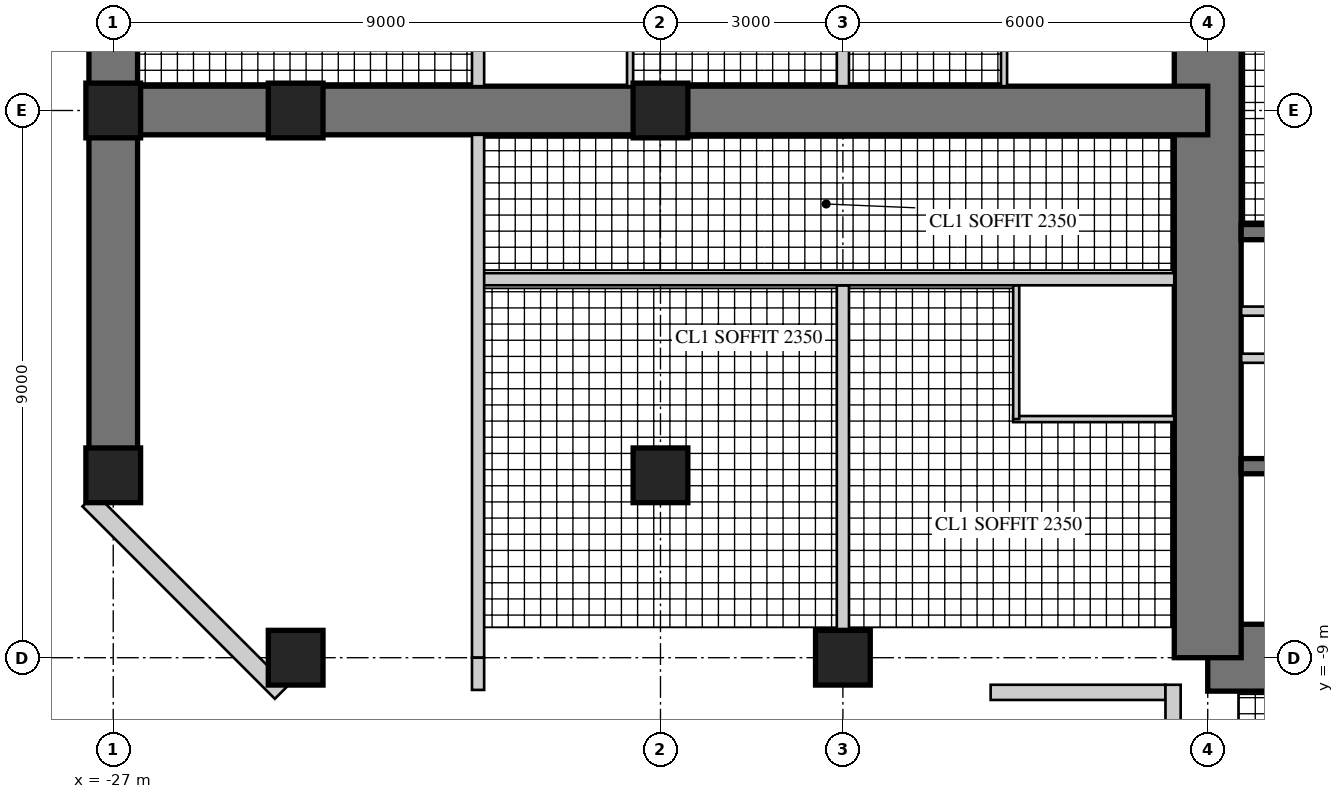
"""IFC4 building model, lengths in metres.
Left out: names, types, materials, properties, quantities, classifications, styles, units other than length and angle.
Written with IfcOpenShell. Run it as: python <this file> out.ifc"""

import sys

from ifc_helpers import new_model, si_unit, direction, frame, frame_2d, origin, origin_2d, place, context, subcontext, project, spatial, rectangle, hollow_rectangle, extrude, element, fill, save


model = new_model("IFC4")
c1 = context("Model", 3, precision=1e-05, world=origin(), true_north=direction((0.0, 1.0)))
c2 = subcontext(c1, "Body", "Model", "MODEL_VIEW")
j1 = project(units=[si_unit("LENGTHUNIT", "METRE"), si_unit("PLANEANGLEUNIT", "RADIAN")], contexts=[c1])
p1 = place(None, origin())
s1 = spatial("IfcSite", under=j1, at=p1, CompositionType="ELEMENT")
p2 = place(p1, origin())
s2 = spatial("IfcBuilding", under=s1, at=p2, CompositionType="ELEMENT")
p3 = place(p2, frame((0.0, 0.0, 206.9)))
s3 = spatial("IfcBuildingStorey", under=s2, at=p3, CompositionType="ELEMENT", Elevation=206.9)
p4 = place(p3, frame((-9.0, -9.0, 0.0), z_axis=(0.0, 0.0, 1.0), x_axis=(1.0, 0.0, 0.0)))
e1 = element("IfcWall", 1, at=p4, inside=s3, PredefinedType="SHEAR", context=c2, shape_type="SweptSolid", body=[
    extrude(rectangle(XDim=18.0, YDim=1.1, at=frame_2d((9.0, 0.0))), origin(), (0.0, 0.0, 1.0), 3.4),
])
p5 = place(p4, frame((9.8, 0.0, 0.0)))
e2 = element("IfcOpeningElement", 2, at=p5, cuts=e1, PredefinedType="OPENING", context=c2, shape_type="SweptSolid", body=[
    extrude(rectangle(XDim=1.0, YDim=2.4, at=frame_2d((0.5, 1.2))), frame((0.0, 0.56, 0.0), z_axis=(0.0, -1.0, 0.0), x_axis=(1.0, 0.0, 0.0)), (0.0, 0.0, 1.0), 1.12),
])
p6 = place(p3, frame((-9.0, 9.0, 0.0), z_axis=(0.0, 0.0, 1.0), x_axis=(0.0, -1.0, 0.0)))
e3 = element("IfcWall", 3, at=p6, inside=s3, PredefinedType="SHEAR", context=c2, shape_type="SweptSolid", body=[
    extrude(rectangle(XDim=18.0, YDim=1.1, at=frame_2d((9.0, 0.0))), origin(), (0.0, 0.0, 1.0), 3.4),
])
p7 = place(p6, frame((9.8, 0.0, 0.0)))
e4 = element("IfcOpeningElement", 4, at=p7, cuts=e3, PredefinedType="OPENING", context=c2, shape_type="SweptSolid", body=[
    extrude(rectangle(XDim=1.0, YDim=2.4, at=frame_2d((0.5, 1.2))), frame((0.0, 0.56, 0.0), z_axis=(0.0, -1.0, 0.0), x_axis=(1.0, 0.0, 0.0)), (0.0, 0.0, 1.0), 1.12),
])
p8 = place(p3, frame((-1.925, -2.0, 0.0), z_axis=(0.0, 0.0, 1.0), x_axis=(-1.0, 0.0, 0.0)))
e5 = element("IfcWall", 5, at=p8, inside=s3, PredefinedType="SHEAR", context=c2, shape_type="SweptSolid", body=[
    extrude(rectangle(XDim=6.525, YDim=0.25, at=frame_2d((3.262, 0.0))), origin(), (0.0, 0.0, 1.0), 3.4),
])
p9 = place(p3, frame((-1.925, -5.85, 0.0), z_axis=(0.0, 0.0, 1.0), x_axis=(-1.0, 0.0, 0.0)))
e6 = element("IfcWall", 6, at=p9, inside=s3, PredefinedType="SHEAR", context=c2, shape_type="SweptSolid", body=[
    extrude(rectangle(XDim=6.525, YDim=0.25, at=frame_2d((3.262, 0.0))), origin(), (0.0, 0.0, 1.0), 3.4),
])
p10 = place(p9, frame((0.471, 0.0, 0.0)))
e7 = element("IfcOpeningElement", 7, at=p10, cuts=e6, PredefinedType="OPENING", context=c2, shape_type="SweptSolid", body=[
    extrude(rectangle(XDim=1.1, YDim=2.2, at=frame_2d((0.55, 1.1))), frame((0.0, 0.135, 0.0), z_axis=(0.0, -1.0, 0.0), x_axis=(1.0, 0.0, 0.0)), (0.0, 0.0, 1.0), 0.27),
])
p11 = place(p9, frame((2.712, 0.0, 0.0)))
e8 = element("IfcOpeningElement", 8, at=p11, cuts=e6, PredefinedType="OPENING", context=c2, shape_type="SweptSolid", body=[
    extrude(rectangle(XDim=1.1, YDim=2.2, at=frame_2d((0.55, 1.1))), frame((0.0, 0.135, 0.0), z_axis=(0.0, -1.0, 0.0), x_axis=(1.0, 0.0, 0.0)), (0.0, 0.0, 1.0), 0.27),
])
p12 = place(p9, frame((4.954, 0.0, 0.0)))
e9 = element("IfcOpeningElement", 9, at=p12, cuts=e6, PredefinedType="OPENING", context=c2, shape_type="SweptSolid", body=[
    extrude(rectangle(XDim=1.1, YDim=2.2, at=frame_2d((0.55, 1.1))), frame((0.0, 0.135, 0.0), z_axis=(0.0, -1.0, 0.0), x_axis=(1.0, 0.0, 0.0)), (0.0, 0.0, 1.0), 0.27),
])
p13 = place(p3, frame((-1.925, -3.3, 0.0), z_axis=(0.0, 0.0, 1.0), x_axis=(-1.0, 0.0, 0.0)))
e10 = element("IfcWall", 10, at=p13, inside=s3, PredefinedType="PARTITIONING", context=c2, shape_type="SweptSolid", body=[
    extrude(rectangle(XDim=6.525, YDim=0.15, at=frame_2d((3.262, 0.0))), origin(), (0.0, 0.0, 1.0), 3.4),
])
p14 = place(p13, frame((0.075, 0.0, 0.0)))
e11 = element("IfcOpeningElement", 11, at=p14, cuts=e10, PredefinedType="OPENING", context=c2, shape_type="SweptSolid", body=[
    extrude(rectangle(XDim=0.8, YDim=2.1, at=frame_2d((0.4, 1.05))), frame((0.0, 0.085, 0.0), z_axis=(0.0, -1.0, 0.0), x_axis=(1.0, 0.0, 0.0)), (0.0, 0.0, 1.0), 0.17),
])
p15 = place(p13, frame((3.675, 0.0, 0.0)))
e12 = element("IfcOpeningElement", 12, at=p15, cuts=e10, PredefinedType="OPENING", context=c2, shape_type="SweptSolid", body=[
    extrude(rectangle(XDim=0.8, YDim=2.1, at=frame_2d((0.4, 1.05))), frame((0.0, 0.085, 0.0), z_axis=(0.0, -1.0, 0.0), x_axis=(1.0, 0.0, 0.0)), (0.0, 0.0, 1.0), 0.17),
])
p16 = place(p3, frame((-9.0, 0.0, 0.0), z_axis=(0.0, 0.0, 1.0), x_axis=(-1.0, 0.0, 0.0)))
e13 = element("IfcWall", 13, at=p16, inside=s3, PredefinedType="SHEAR", context=c2, shape_type="SweptSolid", body=[
    extrude(rectangle(XDim=18.0, YDim=0.8, at=frame_2d((9.0, 0.0))), origin(), (0.0, 0.0, 1.0), 3.4),
])
p17 = place(p16, frame((3.95, 0.0, 0.0)))
e14 = element("IfcOpeningElement", 14, at=p17, cuts=e13, PredefinedType="OPENING", context=c2, shape_type="SweptSolid", body=[
    extrude(rectangle(XDim=1.0, YDim=2.15, at=frame_2d((0.5, 1.075))), frame((0.0, 0.41, 0.0), z_axis=(0.0, -1.0, 0.0), x_axis=(1.0, 0.0, 0.0)), (0.0, 0.0, 1.0), 0.82),
])
p18 = place(p16, frame((6.6, 0.0, 0.0)))
e15 = element("IfcOpeningElement", 15, at=p18, cuts=e13, PredefinedType="OPENING", context=c2, shape_type="SweptSolid", body=[
    extrude(rectangle(XDim=1.0, YDim=2.15, at=frame_2d((0.5, 1.075))), frame((0.0, 0.41, 0.0), z_axis=(0.0, -1.0, 0.0), x_axis=(1.0, 0.0, 0.0)), (0.0, 0.0, 1.0), 0.82),
])
p19 = place(p16, frame((13.25, 0.0, 0.0)))
e16 = element("IfcOpeningElement", 16, at=p19, cuts=e13, PredefinedType="OPENING", context=c2, shape_type="SweptSolid", body=[
    extrude(rectangle(XDim=1.0, YDim=2.2, at=frame_2d((0.5, 1.1))), frame((0.0, 0.41, 0.0), z_axis=(0.0, -1.0, 0.0), x_axis=(1.0, 0.0, 0.0)), (0.0, 0.0, 1.0), 0.82),
])
p20 = place(p3, frame((-27.0, 6.0, 0.0), z_axis=(0.0, 0.0, 1.0), x_axis=(0.0, -1.0, 0.0)))
e17 = element("IfcWall", 17, at=p20, inside=s3, PredefinedType="SHEAR", context=c2, shape_type="SweptSolid", body=[
    extrude(rectangle(XDim=12.0, YDim=0.8, at=frame_2d((6.0, 0.0))), origin(), (0.0, 0.0, 1.0), 3.4),
])
p21 = place(p20, frame((1.625, 0.0, 0.6)))
e18 = element("IfcOpeningElement", 18, at=p21, cuts=e17, PredefinedType="OPENING", context=c2, shape_type="SweptSolid", body=[
    extrude(rectangle(XDim=3.0, YDim=2.4, at=frame_2d((1.5, 1.2))), frame((0.0, 0.41, 0.0), z_axis=(0.0, -1.0, 0.0), x_axis=(1.0, 0.0, 0.0)), (0.0, 0.0, 1.0), 0.82),
])
p22 = place(p20, frame((7.375, 0.0, 0.6)))
e19 = element("IfcOpeningElement", 19, at=p22, cuts=e17, PredefinedType="OPENING", context=c2, shape_type="SweptSolid", body=[
    extrude(rectangle(XDim=3.0, YDim=2.4, at=frame_2d((1.5, 1.2))), frame((0.0, 0.41, 0.0), z_axis=(0.0, -1.0, 0.0), x_axis=(1.0, 0.0, 0.0)), (0.0, 0.0, 1.0), 0.82),
])
for number, where, z_axis, x_axis in (
    (20, (-15.0, -9.0, 0.0), (0.0, 0.0, 1.0), (1.0, 0.0, 0.0)),
    (21, (-24.0, -9.0, 0.0), (0.0, 0.0, 1.0), (1.0, 0.0, 0.0)),
    (22, (-27.0, 0.0, 0.0), (0.0, 0.0, 1.0), (1.0, 0.0, 0.0)),
    (23, (-27.0, -6.0, 0.0), (0.0, 0.0, 1.0), (1.0, 0.0, 0.0)),
    (24, (-18.0, 0.0, 0.0), (0.0, 0.0, 1.0), (1.0, 0.0, 0.0)),
    (25, (-18.0, -6.0, 0.0), (0.0, 0.0, 1.0), (1.0, 0.0, 0.0)),
    (26, (-24.0, 0.0, 0.0), (0.0, 0.0, 1.0), (1.0, 0.0, 0.0)),
):
    element("IfcColumn", number, at=place(p3, frame(where, z_axis=z_axis, x_axis=x_axis)), inside=s3, PredefinedType="COLUMN", context=c2, shape_type="SweptSolid", body=[
        extrude(rectangle(XDim=0.9, YDim=0.9, at=origin_2d()), origin(), (0.0, 0.0, 1.0), 3.4),
    ])
p23 = place(p3, frame((-27.4, -6.406, 0.0), z_axis=(0.0, 0.0, 1.0), x_axis=(0.707079499254, -0.707134062067, 0.0)))
e27 = element("IfcWall", 27, at=p23, inside=s3, PredefinedType="SOLIDWALL", context=c2, shape_type="SweptSolid", body=[
    extrude(rectangle(XDim=4.475, YDim=0.3, at=frame_2d((2.237, 0.0))), origin(), (0.0, 0.0, 1.0), 3.22),
])
p24 = place(p23, frame((1.787, 0.0, 0.3)))
e28 = element("IfcOpeningElement", 28, at=p24, cuts=e27, PredefinedType="OPENING", context=c2, shape_type="SweptSolid", body=[
    extrude(rectangle(XDim=0.9, YDim=2.4, at=frame_2d((0.45, 1.2))), frame((0.0, 0.16, 0.0), z_axis=(0.0, -1.0, 0.0), x_axis=(1.0, 0.0, 0.0)), (0.0, 0.0, 1.0), 0.32),
])
p25 = place(p3, frame((-12.57, -9.57, 0.0), z_axis=(0.0, 0.0, 1.0), x_axis=(1.0, 0.0, 0.0)))
e29 = element("IfcWall", 29, at=p25, inside=s3, PredefinedType="SOLIDWALL", context=c2, shape_type="SweptSolid", body=[
    extrude(rectangle(XDim=2.875, YDim=0.25, at=frame_2d((1.438, 0.0))), origin(), (0.0, 0.0, 1.0), 3.22),
])
p26 = place(p25, frame((0.6, 0.0, 0.0)))
e30 = element("IfcOpeningElement", 30, at=p26, cuts=e29, PredefinedType="OPENING", context=c2, shape_type="SweptSolid", body=[
    extrude(rectangle(XDim=1.0, YDim=2.2, at=frame_2d((0.5, 1.1))), frame((0.0, 0.135, 0.0), z_axis=(0.0, -1.0, 0.0), x_axis=(1.0, 0.0, 0.0)), (0.0, 0.0, 1.0), 0.27),
])
p27 = place(p3, frame((-9.57, -9.445, 0.0), z_axis=(0.0, 0.0, 1.0), x_axis=(0.0, -1.0, 0.0)))
e31 = element("IfcWall", 31, at=p27, inside=s3, PredefinedType="SOLIDWALL", context=c2, shape_type="SweptSolid", body=[
    extrude(rectangle(XDim=3.125, YDim=0.25, at=frame_2d((1.562, 0.0))), origin(), (0.0, 0.0, 1.0), 3.22),
])
p28 = place(p27, frame((0.6, 0.0, 0.0)))
e32 = element("IfcOpeningElement", 32, at=p28, cuts=e31, PredefinedType="OPENING", context=c2, shape_type="SweptSolid", body=[
    extrude(rectangle(XDim=1.0, YDim=2.2, at=frame_2d((0.5, 1.1))), frame((0.0, 0.135, 0.0), z_axis=(0.0, -1.0, 0.0), x_axis=(1.0, 0.0, 0.0)), (0.0, 0.0, 1.0), 0.27),
])
p29 = place(p3, frame((-3.325, -4.075, 0.0), z_axis=(0.0, 0.0, 1.0), x_axis=(-1.0, 0.0, 0.0)))
e33 = element("IfcWall", 33, at=p29, inside=s3, PredefinedType="PARTITIONING", context=c2, shape_type="SweptSolid", body=[
    extrude(rectangle(XDim=5.125, YDim=0.15, at=frame_2d((2.562, 0.0))), origin(), (0.0, 0.0, 1.0), 3.22),
])
p30 = place(p29, frame((2.062, 0.0, 0.0)))
e34 = element("IfcOpeningElement", 34, at=p30, cuts=e33, PredefinedType="OPENING", context=c2, shape_type="SweptSolid", body=[
    extrude(rectangle(XDim=1.0, YDim=2.1, at=frame_2d((0.5, 1.05))), frame((0.0, 0.085, 0.0), z_axis=(0.0, -1.0, 0.0), x_axis=(1.0, 0.0, 0.0)), (0.0, 0.0, 1.0), 0.17),
])
p31 = place(p3, frame((-9.55, -5.075, 0.0), z_axis=(0.0, 0.0, 1.0), x_axis=(-1.0, 0.0, 0.0)))
e35 = element("IfcWall", 35, at=p31, inside=s3, PredefinedType="PARTITIONING", context=c2, shape_type="SweptSolid", body=[
    extrude(rectangle(XDim=2.65, YDim=0.1, at=frame_2d((1.325, 0.0))), origin(), (0.0, 0.0, 1.0), 3.22),
])
p32 = place(p3, frame((-12.15, -2.875, 0.0), z_axis=(0.0, 0.0, 1.0), x_axis=(0.0, -1.0, 0.0)))
e36 = element("IfcWall", 36, at=p32, inside=s3, PredefinedType="PARTITIONING", context=c2, shape_type="SweptSolid", body=[
    extrude(rectangle(XDim=2.2, YDim=0.1, at=frame_2d((1.1, 0.0))), origin(), (0.0, 0.0, 1.0), 3.22),
])
p33 = place(p32, frame((0.55, 0.0, 0.0)))
e37 = element("IfcOpeningElement", 37, at=p33, cuts=e36, PredefinedType="OPENING", context=c2, shape_type="SweptSolid", body=[
    extrude(rectangle(XDim=0.9, YDim=2.1, at=frame_2d((0.45, 1.05))), frame((0.0, 0.06, 0.0), z_axis=(0.0, -1.0, 0.0), x_axis=(1.0, 0.0, 0.0)), (0.0, 0.0, 1.0), 0.12),
])
p34 = place(p3, frame((-12.35, 3.0, 0.0), z_axis=(0.0, 0.0, 1.0), x_axis=(0.0, -1.0, 0.0)))
e38 = element("IfcWall", 38, at=p34, inside=s3, PredefinedType="PARTITIONING", context=c2, shape_type="SweptSolid", body=[
    extrude(rectangle(XDim=2.6, YDim=0.1, at=frame_2d((1.3, 0.0))), origin(), (0.0, 0.0, 1.0), 3.22),
])
p35 = place(p34, frame((0.55, 0.0, 0.0)))
e39 = element("IfcOpeningElement", 39, at=p35, cuts=e38, PredefinedType="OPENING", context=c2, shape_type="SweptSolid", body=[
    extrude(rectangle(XDim=0.9, YDim=2.1, at=frame_2d((0.45, 1.05))), frame((0.0, 0.06, 0.0), z_axis=(0.0, -1.0, 0.0), x_axis=(1.0, 0.0, 0.0)), (0.0, 0.0, 1.0), 0.12),
])
p36 = place(p3, frame((-15.0, -2.875, 0.0), z_axis=(0.0, 0.0, 1.0), x_axis=(0.0, -1.0, 0.0)))
e40 = element("IfcWall", 40, at=p36, inside=s3, PredefinedType="SOLIDWALL", context=c2, shape_type="SweptSolid", body=[
    extrude(rectangle(XDim=5.675, YDim=0.2, at=frame_2d((2.837, 0.0))), origin(), (0.0, 0.0, 1.0), 2.47),
])
p37 = place(p3, frame((-15.0, 8.55, 0.0), z_axis=(0.0, 0.0, 1.0), x_axis=(0.0, -1.0, 0.0)))
e41 = element("IfcWall", 41, at=p37, inside=s3, PredefinedType="SOLIDWALL", context=c2, shape_type="SweptSolid", body=[
    extrude(rectangle(XDim=8.15, YDim=0.2, at=frame_2d((4.075, 0.0))), origin(), (0.0, 0.0, 1.0), 2.47),
])
p38 = place(p3, frame((-18.5, 2.6, 0.0), z_axis=(0.0, 0.0, 1.0), x_axis=(0.0, -1.0, 0.0)))
e42 = element("IfcWall", 42, at=p38, inside=s3, PredefinedType="PARTITIONING", context=c2, shape_type="SweptSolid", body=[
    extrude(rectangle(XDim=2.2, YDim=0.1, at=frame_2d((1.1, 0.0))), origin(), (0.0, 0.0, 1.0), 3.22),
])
p39 = place(p38, frame((0.55, 0.0, 0.0)))
e43 = element("IfcOpeningElement", 43, at=p39, cuts=e42, PredefinedType="OPENING", context=c2, shape_type="SweptSolid", body=[
    extrude(rectangle(XDim=0.9, YDim=2.1, at=frame_2d((0.45, 1.05))), frame((0.0, 0.06, 0.0), z_axis=(0.0, -1.0, 0.0), x_axis=(1.0, 0.0, 0.0)), (0.0, 0.0, 1.0), 0.12),
])
p40 = place(p3, frame((-9.55, -2.775, 0.0), z_axis=(0.0, 0.0, 1.0), x_axis=(-1.0, 0.0, 0.0)))
e44 = element("IfcWall", 44, at=p40, inside=s3, PredefinedType="SOLIDWALL", context=c2, shape_type="SweptSolid", body=[
    extrude(rectangle(XDim=11.45, YDim=0.2, at=frame_2d((5.725, 0.0))), origin(), (0.0, 0.0, 1.0), 3.22),
])
p41 = place(p40, frame((3.4, 0.0, 0.0)))
e45 = element("IfcOpeningElement", 45, at=p41, cuts=e44, PredefinedType="OPENING", context=c2, shape_type="SweptSolid", body=[
    extrude(rectangle(XDim=1.0, YDim=2.15, at=frame_2d((0.5, 1.075))), frame((0.0, 0.11, 0.0), z_axis=(0.0, -1.0, 0.0), x_axis=(1.0, 0.0, 0.0)), (0.0, 0.0, 1.0), 0.22),
])
p42 = place(p40, frame((6.65, 0.0, 0.0)))
e46 = element("IfcOpeningElement", 46, at=p42, cuts=e44, PredefinedType="OPENING", context=c2, shape_type="SweptSolid", body=[
    extrude(rectangle(XDim=1.0, YDim=2.2, at=frame_2d((0.5, 1.1))), frame((0.0, 0.11, 0.0), z_axis=(0.0, -1.0, 0.0), x_axis=(1.0, 0.0, 0.0)), (0.0, 0.0, 1.0), 0.22),
])
p43 = place(p3, frame((-21.0, 9.0, 0.0), z_axis=(0.0, 0.0, 1.0), x_axis=(0.0, -1.0, 0.0)))
e47 = element("IfcWall", 47, at=p43, inside=s3, PredefinedType="SOLIDWALL", context=c2, shape_type="SweptSolid", body=[
    extrude(rectangle(XDim=8.6, YDim=0.2, at=frame_2d((4.3, 0.0))), origin(), (0.0, 0.0, 1.0), 2.62),
])
p44 = place(p3, frame((-21.0, -0.4, 0.0), z_axis=(0.0, 0.0, 1.0), x_axis=(0.0, -1.0, 0.0)))
e48 = element("IfcWall", 48, at=p44, inside=s3, PredefinedType="SOLIDWALL", context=c2, shape_type="SweptSolid", body=[
    extrude(rectangle(XDim=8.6, YDim=0.2, at=frame_2d((4.3, 0.0))), origin(), (0.0, 0.0, 1.0), 2.62),
])
p45 = place(p44, frame((0.4, 0.0, 0.0)))
e49 = element("IfcOpeningElement", 49, at=p45, cuts=e48, PredefinedType="OPENING", context=c2, shape_type="SweptSolid", body=[
    extrude(rectangle(XDim=1.0, YDim=2.2, at=frame_2d((0.5, 1.1))), frame((0.0, 0.11, 0.0), z_axis=(0.0, -1.0, 0.0), x_axis=(1.0, 0.0, 0.0)), (0.0, 0.0, 1.0), 0.22),
])
p46 = place(p3, frame((-21.0, -9.0, 0.0), z_axis=(0.0, 0.0, 1.0), x_axis=(0.0, -1.0, 0.0)))
e50 = element("IfcWall", 50, at=p46, inside=s3, PredefinedType="SOLIDWALL", context=c2, shape_type="SweptSolid", body=[
    extrude(rectangle(XDim=0.53, YDim=0.2, at=frame_2d((0.265, 0.0))), origin(), (0.0, 0.0, 1.0), 3.22),
])
p47 = place(p22, origin())
e51 = element("IfcWindow", 51, at=p47, inside=s3, PartitioningType="SINGLE_PANEL", PredefinedType="WINDOW", context=c2, shape_type="SweptSolid", body=[
    extrude(hollow_rectangle(XDim=3.0, YDim=2.4, WallThickness=0.06, at=frame_2d((1.5, 1.2))), frame((0.0, 0.03, 0.0), z_axis=(0.0, -1.0, 0.0), x_axis=(1.0, 0.0, 0.0)), (0.0, 0.0, 1.0), 0.06),
    extrude(rectangle(XDim=2.879, YDim=2.279, at=frame_2d((1.5, 1.2))), frame((0.0, 0.03, 0.0), z_axis=(0.0, -1.0, 0.0), x_axis=(1.0, 0.0, 0.0)), (0.0, 0.0, 1.0), 0.06),
])
fill(e19, e51)
p48 = place(p24, origin())
e52 = element("IfcWindow", 52, at=p48, inside=s3, PartitioningType="SINGLE_PANEL", PredefinedType="WINDOW", context=c2, shape_type="SweptSolid", body=[
    extrude(hollow_rectangle(XDim=0.9, YDim=2.4, WallThickness=0.06, at=frame_2d((0.45, 1.2))), frame((0.0, 0.03, 0.0), z_axis=(0.0, -1.0, 0.0), x_axis=(1.0, 0.0, 0.0)), (0.0, 0.0, 1.0), 0.06),
    extrude(rectangle(XDim=0.779, YDim=2.279, at=frame_2d((0.45, 1.2))), frame((0.0, 0.03, 0.0), z_axis=(0.0, -1.0, 0.0), x_axis=(1.0, 0.0, 0.0)), (0.0, 0.0, 1.0), 0.06),
])
fill(e28, e52)
p49 = place(p26, origin())
e53 = element("IfcDoor", 53, at=p49, inside=s3, OperationType="SINGLE_SWING_RIGHT", PredefinedType="DOOR", context=c2, shape_type="SweptSolid", body=[
    extrude(hollow_rectangle(XDim=1.0, YDim=2.2, WallThickness=0.06, at=frame_2d((0.5, 1.1))), frame((0.0, 0.025, 0.0), z_axis=(0.0, -1.0, 0.0), x_axis=(1.0, 0.0, 0.0)), (0.0, 0.0, 1.0), 0.05),
    extrude(rectangle(XDim=0.879, YDim=2.079, at=frame_2d((0.5, 1.1))), frame((0.0, 0.025, 0.0), z_axis=(0.0, -1.0, 0.0), x_axis=(1.0, 0.0, 0.0)), (0.0, 0.0, 1.0), 0.05),
])
fill(e30, e53)
p50 = place(p33, origin())
e54 = element("IfcDoor", 54, at=p50, inside=s3, OperationType="SINGLE_SWING_LEFT", PredefinedType="DOOR", context=c2, shape_type="SweptSolid", body=[
    extrude(rectangle(XDim=0.9, YDim=2.1, at=frame_2d((0.45, 1.05))), frame((0.0, 0.025, 0.0), z_axis=(0.0, -1.0, 0.0), x_axis=(1.0, 0.0, 0.0)), (0.0, 0.0, 1.0), 0.05),
])
fill(e37, e54)
p51 = place(p41, origin())
e55 = element("IfcDoor", 55, at=p51, inside=s3, OperationType="SINGLE_SWING_LEFT", PredefinedType="DOOR", context=c2, shape_type="SweptSolid", body=[
    extrude(rectangle(XDim=1.0, YDim=2.15, at=frame_2d((0.5, 1.075))), frame((0.0, 0.025, 0.0), z_axis=(0.0, -1.0, 0.0), x_axis=(1.0, 0.0, 0.0)), (0.0, 0.0, 1.0), 0.05),
])
fill(e45, e55)
p52 = place(p42, origin())
e56 = element("IfcDoor", 56, at=p52, inside=s3, OperationType="SINGLE_SWING_LEFT", PredefinedType="DOOR", context=c2, shape_type="SweptSolid", body=[
    extrude(rectangle(XDim=1.0, YDim=2.2, at=frame_2d((0.5, 1.1))), frame((0.0, 0.025, 0.0), z_axis=(0.0, -1.0, 0.0), x_axis=(1.0, 0.0, 0.0)), (0.0, 0.0, 1.0), 0.05),
])
fill(e46, e56)
p53 = place(p45, frame((1.0, 0.0, 0.0), z_axis=(0.0, 0.0, 1.0), x_axis=(-1.0, 0.0, 0.0)))
e57 = element("IfcDoor", 57, at=p53, inside=s3, OperationType="SINGLE_SWING_RIGHT", PredefinedType="DOOR", context=c2, shape_type="SweptSolid", body=[
    extrude(rectangle(XDim=1.0, YDim=2.2, at=frame_2d((0.5, 1.1))), frame((0.0, 0.025, 0.0), z_axis=(0.0, -1.0, 0.0), x_axis=(1.0, 0.0, 0.0)), (0.0, 0.0, 1.0), 0.05),
])
fill(e49, e57)
p54 = place(p17, frame((1.0, 0.0, 0.0), z_axis=(0.0, 0.0, 1.0), x_axis=(-1.0, 0.0, 0.0)))
e58 = element("IfcDoor", 58, at=p54, inside=s3, OperationType="SINGLE_SWING_RIGHT", PredefinedType="DOOR", context=c2, shape_type="SweptSolid", body=[
    extrude(rectangle(XDim=1.0, YDim=2.15, at=frame_2d((0.5, 1.075))), frame((0.0, 0.025, 0.0), z_axis=(0.0, -1.0, 0.0), x_axis=(1.0, 0.0, 0.0)), (0.0, 0.0, 1.0), 0.05),
])
fill(e14, e58)
p55 = place(p18, frame((1.0, 0.0, 0.0), z_axis=(0.0, 0.0, 1.0), x_axis=(-1.0, 0.0, 0.0)))
e59 = element("IfcDoor", 59, at=p55, inside=s3, OperationType="SINGLE_SWING_RIGHT", PredefinedType="DOOR", context=c2, shape_type="SweptSolid", body=[
    extrude(rectangle(XDim=1.0, YDim=2.15, at=frame_2d((0.5, 1.075))), frame((0.0, 0.025, 0.0), z_axis=(0.0, -1.0, 0.0), x_axis=(1.0, 0.0, 0.0)), (0.0, 0.0, 1.0), 0.05),
])
fill(e15, e59)
p56 = place(p19, origin())
e60 = element("IfcDoor", 60, at=p56, inside=s3, OperationType="SINGLE_SWING_LEFT", PredefinedType="DOOR", context=c2, shape_type="SweptSolid", body=[
    extrude(rectangle(XDim=1.0, YDim=2.2, at=frame_2d((0.5, 1.1))), frame((0.0, 0.025, 0.0), z_axis=(0.0, -1.0, 0.0), x_axis=(1.0, 0.0, 0.0)), (0.0, 0.0, 1.0), 0.05),
])
fill(e16, e60)
p57 = place(p7, origin())
e61 = element("IfcDoor", 61, at=p57, inside=s3, OperationType="SINGLE_SWING_RIGHT", PredefinedType="DOOR", context=c2, shape_type="SweptSolid", body=[
    extrude(rectangle(XDim=1.0, YDim=2.4, at=frame_2d((0.5, 1.2))), frame((0.0, 0.055, 0.0), z_axis=(0.0, -1.0, 0.0), x_axis=(1.0, 0.0, 0.0)), (0.0, 0.0, 1.0), 0.05),
])
fill(e4, e61)
save(model, sys.argv[1])
